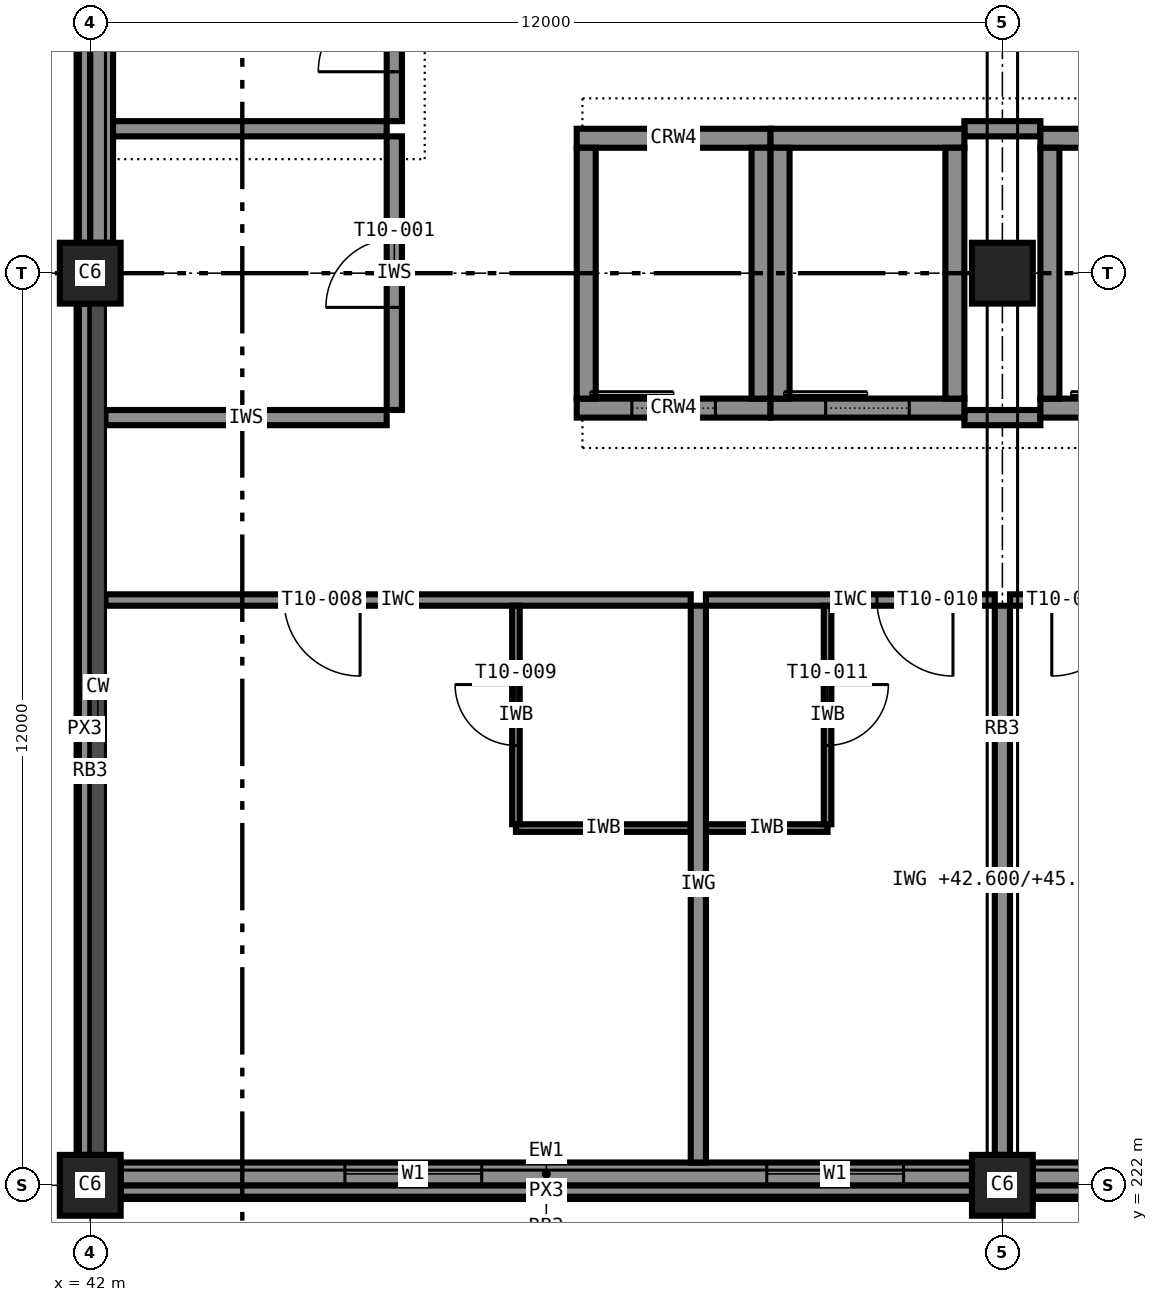
"""IFC4 building model, lengths in metres.
Left out: names, types, materials, properties, quantities, classifications, styles, units other than length and angle.
Written with IfcOpenShell. Run it as: python <this file> out.ifc"""

import sys

from ifc_helpers import new_model, si_unit, direction, frame, frame_2d, origin, origin_2d, place, context, subcontext, project, spatial, rectangle, extrude, element, fill, save


model = new_model("IFC4")
c1 = context("Model", 3, precision=1e-05, world=origin(), true_north=direction((0.0, 1.0)))
c2 = subcontext(c1, "Body", "Model", "MODEL_VIEW")
j1 = project(units=[si_unit("LENGTHUNIT", "METRE"), si_unit("PLANEANGLEUNIT", "RADIAN")], contexts=[c1])
p1 = place(None, origin())
s1 = spatial("IfcSite", under=j1, at=p1, CompositionType="ELEMENT")
p2 = place(p1, origin())
s2 = spatial("IfcBuilding", under=s1, at=p2, CompositionType="ELEMENT")
p3 = place(p2, frame((0.0, 0.0, 42.6)))
s3 = spatial("IfcBuildingStorey", under=s2, at=p3, CompositionType="ELEMENT", Elevation=42.6)
for number, where, z_axis, x_axis in (
    (1, (42.0, 222.0, 0.0), (0.0, 0.0, 1.0), (1.0, 0.0, 0.0)),
    (2, (42.0, 234.0, 0.0), (0.0, 0.0, 1.0), (1.0, 0.0, 0.0)),
    (3, (54.0, 222.0, 0.0), (0.0, 0.0, 1.0), (1.0, 0.0, 0.0)),
    (4, (54.0, 234.0, 0.0), (0.0, 0.0, 1.0), (1.0, 0.0, 0.0)),
):
    element("IfcColumn", number, at=place(p3, frame(where, z_axis=z_axis, x_axis=x_axis)), inside=s3, PredefinedType="COLUMN", context=c2, shape_type="SweptSolid", body=[
        extrude(rectangle(XDim=0.8, YDim=0.8, at=origin_2d()), origin(), (0.0, 0.0, 1.0), 3.6),
    ])
p4 = place(p3, frame((54.5, 232.225, 0.0), z_axis=(0.0, 0.0, 1.0), x_axis=(1.0, 0.0, 0.0)))
e5 = element("IfcWall", 5, at=p4, inside=s3, PredefinedType="SHEAR", context=c2, shape_type="SweptSolid", body=[
    extrude(rectangle(XDim=3.0, YDim=0.25, at=frame_2d((1.5, 0.0))), origin(), (0.0, 0.0, 1.0), 3.6),
])
p5 = place(p4, frame((0.95, 0.0, 0.0)))
e6 = element("IfcOpeningElement", 6, at=p5, cuts=e5, PredefinedType="OPENING", context=c2, shape_type="SweptSolid", body=[
    extrude(rectangle(XDim=1.1, YDim=2.1, at=frame_2d((0.55, 1.05))), frame((0.0, 0.135, 0.0), z_axis=(0.0, -1.0, 0.0), x_axis=(1.0, 0.0, 0.0)), (0.0, 0.0, 1.0), 0.27),
])
p6 = place(p3, frame((54.5, 235.775, 0.0), z_axis=(0.0, 0.0, 1.0), x_axis=(1.0, 0.0, 0.0)))
e7 = element("IfcWall", 7, at=p6, inside=s3, PredefinedType="SHEAR", context=c2, shape_type="SweptSolid", body=[
    extrude(rectangle(XDim=3.0, YDim=0.25, at=frame_2d((1.5, 0.0))), origin(), (0.0, 0.0, 1.0), 3.6),
])
p7 = place(p3, frame((54.625, 232.35, 0.0), z_axis=(0.0, 0.0, 1.0), x_axis=(0.0, 1.0, 0.0)))
e8 = element("IfcWall", 8, at=p7, inside=s3, PredefinedType="SHEAR", context=c2, shape_type="SweptSolid", body=[
    extrude(rectangle(XDim=3.3, YDim=0.25, at=frame_2d((1.65, 0.0))), origin(), (0.0, 0.0, 1.0), 3.6),
])
p8 = place(p3, frame((48.4, 232.225, 0.0), z_axis=(0.0, 0.0, 1.0), x_axis=(1.0, 0.0, 0.0)))
e9 = element("IfcWall", 9, at=p8, inside=s3, PredefinedType="SHEAR", context=c2, shape_type="SweptSolid", body=[
    extrude(rectangle(XDim=2.55, YDim=0.25, at=frame_2d((1.275, 0.0))), origin(), (0.0, 0.0, 1.0), 3.6),
])
p9 = place(p8, frame((0.725, 0.0, 0.0)))
e10 = element("IfcOpeningElement", 10, at=p9, cuts=e9, PredefinedType="OPENING", context=c2, shape_type="SweptSolid", body=[
    extrude(rectangle(XDim=1.1, YDim=2.1, at=frame_2d((0.55, 1.05))), frame((0.0, 0.135, 0.0), z_axis=(0.0, -1.0, 0.0), x_axis=(1.0, 0.0, 0.0)), (0.0, 0.0, 1.0), 0.27),
])
p10 = place(p3, frame((48.4, 235.775, 0.0), z_axis=(0.0, 0.0, 1.0), x_axis=(1.0, 0.0, 0.0)))
e11 = element("IfcWall", 11, at=p10, inside=s3, PredefinedType="SHEAR", context=c2, shape_type="SweptSolid", body=[
    extrude(rectangle(XDim=2.55, YDim=0.25, at=frame_2d((1.275, 0.0))), origin(), (0.0, 0.0, 1.0), 3.6),
])
for number, where, z_axis, x_axis in (
    (12, (48.525, 232.35, 0.0), (0.0, 0.0, 1.0), (0.0, 1.0, 0.0)),
    (13, (50.825, 232.35, 0.0), (0.0, 0.0, 1.0), (0.0, 1.0, 0.0)),
):
    element("IfcWall", number, at=place(p3, frame(where, z_axis=z_axis, x_axis=x_axis)), inside=s3, PredefinedType="SHEAR", context=c2, shape_type="SweptSolid", body=[
        extrude(rectangle(XDim=3.3, YDim=0.25, at=frame_2d((1.65, 0.0))), origin(), (0.0, 0.0, 1.0), 3.6),
    ])
p11 = place(p3, frame((50.95, 232.225, 0.0), z_axis=(0.0, 0.0, 1.0), x_axis=(1.0, 0.0, 0.0)))
e14 = element("IfcWall", 14, at=p11, inside=s3, PredefinedType="SHEAR", context=c2, shape_type="SweptSolid", body=[
    extrude(rectangle(XDim=2.55, YDim=0.25, at=frame_2d((1.275, 0.0))), origin(), (0.0, 0.0, 1.0), 3.6),
])
p12 = place(p11, frame((0.725, 0.0, 0.0)))
e15 = element("IfcOpeningElement", 15, at=p12, cuts=e14, PredefinedType="OPENING", context=c2, shape_type="SweptSolid", body=[
    extrude(rectangle(XDim=1.1, YDim=2.1, at=frame_2d((0.55, 1.05))), frame((0.0, 0.135, 0.0), z_axis=(0.0, -1.0, 0.0), x_axis=(1.0, 0.0, 0.0)), (0.0, 0.0, 1.0), 0.27),
])
p13 = place(p3, frame((50.95, 235.775, 0.0), z_axis=(0.0, 0.0, 1.0), x_axis=(1.0, 0.0, 0.0)))
e16 = element("IfcWall", 16, at=p13, inside=s3, PredefinedType="SHEAR", context=c2, shape_type="SweptSolid", body=[
    extrude(rectangle(XDim=2.55, YDim=0.25, at=frame_2d((1.275, 0.0))), origin(), (0.0, 0.0, 1.0), 3.6),
])
for number, where, z_axis, x_axis in (
    (17, (51.075, 232.35, 0.0), (0.0, 0.0, 1.0), (0.0, 1.0, 0.0)),
    (18, (53.375, 232.35, 0.0), (0.0, 0.0, 1.0), (0.0, 1.0, 0.0)),
):
    element("IfcWall", number, at=place(p3, frame(where, z_axis=z_axis, x_axis=x_axis)), inside=s3, PredefinedType="SHEAR", context=c2, shape_type="SweptSolid", body=[
        extrude(rectangle(XDim=3.3, YDim=0.25, at=frame_2d((1.65, 0.0))), origin(), (0.0, 0.0, 1.0), 3.6),
    ])
p14 = place(p3, frame((42.4, 222.15, 0.0), z_axis=(0.0, 0.0, 1.0), x_axis=(1.0, 0.0, 0.0)))
e19 = element("IfcWall", 19, at=p14, inside=s3, PredefinedType="STANDARD", context=c2, shape_type="SweptSolid", body=[
    extrude(rectangle(XDim=11.2, YDim=0.3, at=frame_2d((5.6, 0.0))), origin(), (0.0, 0.0, 1.0), 2.6),
])
p15 = place(p14, frame((2.95, 0.0, 0.85)))
e20 = element("IfcOpeningElement", 20, at=p15, cuts=e19, PredefinedType="OPENING", context=c2, shape_type="SweptSolid", body=[
    extrude(rectangle(XDim=1.8, YDim=1.75, at=frame_2d((0.9, 0.875))), frame((0.0, 0.16, 0.0), z_axis=(0.0, -1.0, 0.0), x_axis=(1.0, 0.0, 0.0)), (0.0, 0.0, 1.0), 0.32),
])
p16 = place(p14, frame((8.5, 0.0, 0.85)))
e21 = element("IfcOpeningElement", 21, at=p16, cuts=e19, PredefinedType="OPENING", context=c2, shape_type="SweptSolid", body=[
    extrude(rectangle(XDim=1.8, YDim=1.75, at=frame_2d((0.9, 0.875))), frame((0.0, 0.16, 0.0), z_axis=(0.0, -1.0, 0.0), x_axis=(1.0, 0.0, 0.0)), (0.0, 0.0, 1.0), 0.32),
])
p17 = place(p3, frame((54.4, 222.15, 0.0), z_axis=(0.0, 0.0, 1.0), x_axis=(1.0, 0.0, 0.0)))
e22 = element("IfcWall", 22, at=p17, inside=s3, PredefinedType="STANDARD", context=c2, shape_type="SweptSolid", body=[
    extrude(rectangle(XDim=11.2, YDim=0.3, at=frame_2d((5.6, 0.0))), origin(), (0.0, 0.0, 1.0), 2.6),
])
p18 = place(p17, frame((0.9, 0.0, 0.85)))
e23 = element("IfcOpeningElement", 23, at=p18, cuts=e22, PredefinedType="OPENING", context=c2, shape_type="SweptSolid", body=[
    extrude(rectangle(XDim=1.8, YDim=1.75, at=frame_2d((0.9, 0.875))), frame((0.0, 0.16, 0.0), z_axis=(0.0, -1.0, 0.0), x_axis=(1.0, 0.0, 0.0)), (0.0, 0.0, 1.0), 0.32),
])
p19 = place(p17, frame((4.7, 0.0, 0.85)))
e24 = element("IfcOpeningElement", 24, at=p19, cuts=e22, PredefinedType="OPENING", context=c2, shape_type="SweptSolid", body=[
    extrude(rectangle(XDim=1.8, YDim=1.75, at=frame_2d((0.9, 0.875))), frame((0.0, 0.16, 0.0), z_axis=(0.0, -1.0, 0.0), x_axis=(1.0, 0.0, 0.0)), (0.0, 0.0, 1.0), 0.32),
])
p20 = place(p17, frame((8.5, 0.0, 0.85)))
e25 = element("IfcOpeningElement", 25, at=p20, cuts=e22, PredefinedType="OPENING", context=c2, shape_type="SweptSolid", body=[
    extrude(rectangle(XDim=1.8, YDim=1.75, at=frame_2d((0.9, 0.875))), frame((0.0, 0.16, 0.0), z_axis=(0.0, -1.0, 0.0), x_axis=(1.0, 0.0, 0.0)), (0.0, 0.0, 1.0), 0.32),
])
for number, where, z_axis, x_axis in (
    (26, (42.4, 221.925, 3.4), (0.0, 0.0, 1.0), (1.0, 0.0, 0.0)),
    (27, (54.4, 221.925, 3.4), (0.0, 0.0, 1.0), (1.0, 0.0, 0.0)),
):
    element("IfcWall", number, at=place(p3, frame(where, z_axis=z_axis, x_axis=x_axis)), inside=s3, PredefinedType="STANDARD", context=c2, shape_type="SweptSolid", body=[
        extrude(rectangle(XDim=11.2, YDim=0.15, at=frame_2d((5.6, 0.0))), origin(), (0.0, 0.0, 1.0), 0.2),
    ])
p21 = place(p3, frame((42.15, 245.6, 0.0), z_axis=(0.0, 0.0, 1.0), x_axis=(0.0, -1.0, 0.0)))
e28 = element("IfcWall", 28, at=p21, inside=s3, PredefinedType="STANDARD", context=c2, shape_type="SweptSolid", body=[
    extrude(rectangle(XDim=11.2, YDim=0.3, at=frame_2d((5.6, 0.0))), origin(), (0.0, 0.0, 1.0), 2.6),
])
for number, where, z_axis, x_axis in (
    (29, (41.925, 245.6, 3.4), (0.0, 0.0, 1.0), (0.0, -1.0, 0.0)),
    (30, (41.925, 233.6, 3.4), (0.0, 0.0, 1.0), (0.0, -1.0, 0.0)),
):
    element("IfcWall", number, at=place(p3, frame(where, z_axis=z_axis, x_axis=x_axis)), inside=s3, PredefinedType="STANDARD", context=c2, shape_type="SweptSolid", body=[
        extrude(rectangle(XDim=11.2, YDim=0.15, at=frame_2d((5.6, 0.0))), origin(), (0.0, 0.0, 1.0), 0.2),
    ])
p22 = place(p3, frame((42.2, 232.1, 0.0), z_axis=(0.0, 0.0, 1.0), x_axis=(1.0, 0.0, 0.0)))
e31 = element("IfcWall", 31, at=p22, inside=s3, PredefinedType="PARTITIONING", context=c2, shape_type="SweptSolid", body=[
    extrude(rectangle(XDim=3.7, YDim=0.2, at=frame_2d((1.85, 0.0))), origin(), (0.0, 0.0, 1.0), 3.4),
])
p23 = place(p3, frame((53.5, 232.1, 0.0), z_axis=(0.0, 0.0, 1.0), x_axis=(1.0, 0.0, 0.0)))
e32 = element("IfcWall", 32, at=p23, inside=s3, PredefinedType="PARTITIONING", context=c2, shape_type="SweptSolid", body=[
    extrude(rectangle(XDim=1.0, YDim=0.2, at=frame_2d((0.5, 0.0))), origin(), (0.0, 0.0, 1.0), 3.4),
])
p24 = place(p3, frame((42.3, 235.9, 0.0), z_axis=(0.0, 0.0, 1.0), x_axis=(1.0, 0.0, 0.0)))
e33 = element("IfcWall", 33, at=p24, inside=s3, PredefinedType="PARTITIONING", context=c2, shape_type="SweptSolid", body=[
    extrude(rectangle(XDim=3.6, YDim=0.2, at=frame_2d((1.8, 0.0))), origin(), (0.0, 0.0, 1.0), 3.4),
])
p25 = place(p3, frame((53.5, 235.9, 0.0), z_axis=(0.0, 0.0, 1.0), x_axis=(1.0, 0.0, 0.0)))
e34 = element("IfcWall", 34, at=p25, inside=s3, PredefinedType="PARTITIONING", context=c2, shape_type="SweptSolid", body=[
    extrude(rectangle(XDim=1.0, YDim=0.2, at=frame_2d((0.5, 0.0))), origin(), (0.0, 0.0, 1.0), 3.4),
])
p26 = place(p3, frame((46.0, 232.2, 0.0), z_axis=(0.0, 0.0, 1.0), x_axis=(0.0, 1.0, 0.0)))
e35 = element("IfcWall", 35, at=p26, inside=s3, PredefinedType="PARTITIONING", context=c2, shape_type="SweptSolid", body=[
    extrude(rectangle(XDim=3.6, YDim=0.2, at=frame_2d((1.8, 0.0))), origin(), (0.0, 0.0, 1.0), 3.4),
])
p27 = place(p26, frame((1.35, 0.0, 0.0)))
e36 = element("IfcOpeningElement", 36, at=p27, cuts=e35, PredefinedType="OPENING", context=c2, shape_type="SweptSolid", body=[
    extrude(rectangle(XDim=0.9, YDim=2.1, at=frame_2d((0.45, 1.05))), frame((0.0, 0.11, 0.0), z_axis=(0.0, -1.0, 0.0), x_axis=(1.0, 0.0, 0.0)), (0.0, 0.0, 1.0), 0.22),
])
p28 = place(p3, frame((46.0, 236.0, 0.0), z_axis=(0.0, 0.0, 1.0), x_axis=(0.0, 1.0, 0.0)))
e37 = element("IfcWall", 37, at=p28, inside=s3, PredefinedType="PARTITIONING", context=c2, shape_type="SweptSolid", body=[
    extrude(rectangle(XDim=2.3, YDim=0.2, at=frame_2d((1.15, 0.0))), origin(), (0.0, 0.0, 1.0), 3.4),
])
p29 = place(p28, frame((0.65, 0.0, 0.0)))
e38 = element("IfcOpeningElement", 38, at=p29, cuts=e37, PredefinedType="OPENING", context=c2, shape_type="SweptSolid", body=[
    extrude(rectangle(XDim=1.0, YDim=2.1, at=frame_2d((0.5, 1.05))), frame((0.0, 0.11, 0.0), z_axis=(0.0, -1.0, 0.0), x_axis=(1.0, 0.0, 0.0)), (0.0, 0.0, 1.0), 0.22),
])
p30 = place(p3, frame((49.9, 229.7, 0.0), z_axis=(0.0, 0.0, 1.0), x_axis=(-1.0, 0.0, 0.0)))
e39 = element("IfcWall", 39, at=p30, inside=s3, PredefinedType="PARTITIONING", context=c2, shape_type="SweptSolid", body=[
    extrude(rectangle(XDim=7.7, YDim=0.15, at=frame_2d((3.85, 0.0))), origin(), (0.0, 0.0, 1.0), 3.4),
])
p31 = place(p30, frame((4.35, 0.0, 0.0)))
e40 = element("IfcOpeningElement", 40, at=p31, cuts=e39, PredefinedType="OPENING", context=c2, shape_type="SweptSolid", body=[
    extrude(rectangle(XDim=1.0, YDim=2.1, at=frame_2d((0.5, 1.05))), frame((0.0, 0.085, 0.0), z_axis=(0.0, -1.0, 0.0), x_axis=(1.0, 0.0, 0.0)), (0.0, 0.0, 1.0), 0.17),
])
p32 = place(p3, frame((47.6, 226.7, 0.0), z_axis=(0.0, 0.0, 1.0), x_axis=(1.0, 0.0, 0.0)))
e41 = element("IfcWall", 41, at=p32, inside=s3, PredefinedType="PARTITIONING", context=c2, shape_type="SweptSolid", body=[
    extrude(rectangle(XDim=2.3, YDim=0.1, at=frame_2d((1.15, 0.0))), origin(), (0.0, 0.0, 1.0), 3.4),
])
p33 = place(p3, frame((47.6, 226.75, 0.0), z_axis=(0.0, 0.0, 1.0), x_axis=(0.0, 1.0, 0.0)))
e42 = element("IfcWall", 42, at=p33, inside=s3, PredefinedType="PARTITIONING", context=c2, shape_type="SweptSolid", body=[
    extrude(rectangle(XDim=2.875, YDim=0.1, at=frame_2d((1.438, 0.0))), origin(), (0.0, 0.0, 1.0), 3.4),
])
p34 = place(p33, frame((1.038, 0.0, 0.0)))
e43 = element("IfcOpeningElement", 43, at=p34, cuts=e42, PredefinedType="OPENING", context=c2, shape_type="SweptSolid", body=[
    extrude(rectangle(XDim=0.8, YDim=2.1, at=frame_2d((0.4, 1.05))), frame((0.0, 0.06, 0.0), z_axis=(0.0, -1.0, 0.0), x_axis=(1.0, 0.0, 0.0)), (0.0, 0.0, 1.0), 0.12),
])
p35 = place(p3, frame((53.9, 229.7, 0.0), z_axis=(0.0, 0.0, 1.0), x_axis=(-1.0, 0.0, 0.0)))
e44 = element("IfcWall", 44, at=p35, inside=s3, PredefinedType="PARTITIONING", context=c2, shape_type="SweptSolid", body=[
    extrude(rectangle(XDim=3.8, YDim=0.15, at=frame_2d((1.9, 0.0))), origin(), (0.0, 0.0, 1.0), 3.4),
])
p36 = place(p35, frame((0.55, 0.0, 0.0)))
e45 = element("IfcOpeningElement", 45, at=p36, cuts=e44, PredefinedType="OPENING", context=c2, shape_type="SweptSolid", body=[
    extrude(rectangle(XDim=1.0, YDim=2.1, at=frame_2d((0.5, 1.05))), frame((0.0, 0.085, 0.0), z_axis=(0.0, -1.0, 0.0), x_axis=(1.0, 0.0, 0.0)), (0.0, 0.0, 1.0), 0.17),
])
p37 = place(p3, frame((50.1, 226.7, 0.0), z_axis=(0.0, 0.0, 1.0), x_axis=(1.0, 0.0, 0.0)))
e46 = element("IfcWall", 46, at=p37, inside=s3, PredefinedType="PARTITIONING", context=c2, shape_type="SweptSolid", body=[
    extrude(rectangle(XDim=1.6, YDim=0.1, at=frame_2d((0.8, 0.0))), origin(), (0.0, 0.0, 1.0), 3.4),
])
p38 = place(p3, frame((51.7, 229.625, 0.0), z_axis=(0.0, 0.0, 1.0), x_axis=(0.0, -1.0, 0.0)))
e47 = element("IfcWall", 47, at=p38, inside=s3, PredefinedType="PARTITIONING", context=c2, shape_type="SweptSolid", body=[
    extrude(rectangle(XDim=2.875, YDim=0.1, at=frame_2d((1.438, 0.0))), origin(), (0.0, 0.0, 1.0), 3.4),
])
p39 = place(p38, frame((1.038, 0.0, 0.0)))
e48 = element("IfcOpeningElement", 48, at=p39, cuts=e47, PredefinedType="OPENING", context=c2, shape_type="SweptSolid", body=[
    extrude(rectangle(XDim=0.8, YDim=2.1, at=frame_2d((0.4, 1.05))), frame((0.0, 0.06, 0.0), z_axis=(0.0, -1.0, 0.0), x_axis=(1.0, 0.0, 0.0)), (0.0, 0.0, 1.0), 0.12),
])
p40 = place(p3, frame((57.9, 229.7, 0.0), z_axis=(0.0, 0.0, 1.0), x_axis=(-1.0, 0.0, 0.0)))
e49 = element("IfcWall", 49, at=p40, inside=s3, PredefinedType="PARTITIONING", context=c2, shape_type="SweptSolid", body=[
    extrude(rectangle(XDim=3.8, YDim=0.15, at=frame_2d((1.9, 0.0))), origin(), (0.0, 0.0, 1.0), 3.4),
])
p41 = place(p40, frame((2.25, 0.0, 0.0)))
e50 = element("IfcOpeningElement", 50, at=p41, cuts=e49, PredefinedType="OPENING", context=c2, shape_type="SweptSolid", body=[
    extrude(rectangle(XDim=1.0, YDim=2.1, at=frame_2d((0.5, 1.05))), frame((0.0, 0.085, 0.0), z_axis=(0.0, -1.0, 0.0), x_axis=(1.0, 0.0, 0.0)), (0.0, 0.0, 1.0), 0.17),
])
p42 = place(p3, frame((50.0, 222.3, 0.0), z_axis=(0.0, 0.0, 1.0), x_axis=(0.0, 1.0, 0.0)))
e51 = element("IfcWall", 51, at=p42, inside=s3, PredefinedType="PARTITIONING", context=c2, shape_type="SweptSolid", body=[
    extrude(rectangle(XDim=7.325, YDim=0.2, at=frame_2d((3.663, 0.0))), origin(), (0.0, 0.0, 1.0), 3.4),
])
p43 = place(p3, frame((54.0, 222.4, 0.0), z_axis=(0.0, 0.0, 1.0), x_axis=(0.0, 1.0, 0.0)))
e52 = element("IfcWall", 52, at=p43, inside=s3, PredefinedType="PARTITIONING", context=c2, shape_type="SweptSolid", body=[
    extrude(rectangle(XDim=7.225, YDim=0.2, at=frame_2d((3.613, 0.0))), origin(), (0.0, 0.0, 1.0), 2.6),
])
p44 = place(p15, origin())
e53 = element("IfcWindow", 53, at=p44, inside=s3, PartitioningType="SINGLE_PANEL", PredefinedType="WINDOW", context=c2, shape_type="SweptSolid", body=[
    extrude(rectangle(XDim=1.8, YDim=1.75, at=frame_2d((0.9, 0.875))), frame((0.0, 0.03, 0.0), z_axis=(0.0, -1.0, 0.0), x_axis=(1.0, 0.0, 0.0)), (0.0, 0.0, 1.0), 0.06),
])
fill(e20, e53)
p45 = place(p16, origin())
e54 = element("IfcWindow", 54, at=p45, inside=s3, PartitioningType="SINGLE_PANEL", PredefinedType="WINDOW", context=c2, shape_type="SweptSolid", body=[
    extrude(rectangle(XDim=1.8, YDim=1.75, at=frame_2d((0.9, 0.875))), frame((0.0, 0.03, 0.0), z_axis=(0.0, -1.0, 0.0), x_axis=(1.0, 0.0, 0.0)), (0.0, 0.0, 1.0), 0.06),
])
fill(e21, e54)
p46 = place(p27, origin())
e55 = element("IfcDoor", 55, at=p46, inside=s3, OperationType="SINGLE_SWING_LEFT", PredefinedType="DOOR", context=c2, shape_type="SweptSolid", body=[
    extrude(rectangle(XDim=0.9, YDim=2.1, at=frame_2d((0.45, 1.05))), frame((0.0, 0.025, 0.0), z_axis=(0.0, -1.0, 0.0), x_axis=(1.0, 0.0, 0.0)), (0.0, 0.0, 1.0), 0.05),
])
fill(e36, e55)
p47 = place(p29, origin())
e56 = element("IfcDoor", 56, at=p47, inside=s3, OperationType="SINGLE_SWING_LEFT", PredefinedType="DOOR", context=c2, shape_type="SweptSolid", body=[
    extrude(rectangle(XDim=1.0, YDim=2.1, at=frame_2d((0.5, 1.05))), frame((0.0, 0.025, 0.0), z_axis=(0.0, -1.0, 0.0), x_axis=(1.0, 0.0, 0.0)), (0.0, 0.0, 1.0), 0.05),
])
fill(e38, e56)
p48 = place(p31, origin())
e57 = element("IfcDoor", 57, at=p48, inside=s3, OperationType="SINGLE_SWING_LEFT", PredefinedType="DOOR", context=c2, shape_type="SweptSolid", body=[
    extrude(rectangle(XDim=1.0, YDim=2.1, at=frame_2d((0.5, 1.05))), frame((0.0, 0.025, 0.0), z_axis=(0.0, -1.0, 0.0), x_axis=(1.0, 0.0, 0.0)), (0.0, 0.0, 1.0), 0.05),
])
fill(e40, e57)
p49 = place(p34, origin())
e58 = element("IfcDoor", 58, at=p49, inside=s3, OperationType="SINGLE_SWING_RIGHT", PredefinedType="DOOR", context=c2, shape_type="SweptSolid", body=[
    extrude(rectangle(XDim=0.8, YDim=2.1, at=frame_2d((0.4, 1.05))), frame((0.0, 0.025, 0.0), z_axis=(0.0, -1.0, 0.0), x_axis=(1.0, 0.0, 0.0)), (0.0, 0.0, 1.0), 0.05),
])
fill(e43, e58)
p50 = place(p36, origin())
e59 = element("IfcDoor", 59, at=p50, inside=s3, OperationType="SINGLE_SWING_LEFT", PredefinedType="DOOR", context=c2, shape_type="SweptSolid", body=[
    extrude(rectangle(XDim=1.0, YDim=2.1, at=frame_2d((0.5, 1.05))), frame((0.0, 0.025, 0.0), z_axis=(0.0, -1.0, 0.0), x_axis=(1.0, 0.0, 0.0)), (0.0, 0.0, 1.0), 0.05),
])
fill(e45, e59)
p51 = place(p39, origin())
e60 = element("IfcDoor", 60, at=p51, inside=s3, OperationType="SINGLE_SWING_LEFT", PredefinedType="DOOR", context=c2, shape_type="SweptSolid", body=[
    extrude(rectangle(XDim=0.8, YDim=2.1, at=frame_2d((0.4, 1.05))), frame((0.0, 0.025, 0.0), z_axis=(0.0, -1.0, 0.0), x_axis=(1.0, 0.0, 0.0)), (0.0, 0.0, 1.0), 0.05),
])
fill(e48, e60)
p52 = place(p41, origin())
e61 = element("IfcDoor", 61, at=p52, inside=s3, OperationType="SINGLE_SWING_RIGHT", PredefinedType="DOOR", context=c2, shape_type="SweptSolid", body=[
    extrude(rectangle(XDim=1.0, YDim=2.1, at=frame_2d((0.5, 1.05))), frame((0.0, 0.025, 0.0), z_axis=(0.0, -1.0, 0.0), x_axis=(1.0, 0.0, 0.0)), (0.0, 0.0, 1.0), 0.05),
])
fill(e50, e61)
p53 = place(p9, origin())
e62 = element("IfcDoor", 62, at=p53, inside=s3, OperationType="SLIDING_TO_LEFT", PredefinedType="DOOR", context=c2, shape_type="SweptSolid", body=[
    extrude(rectangle(XDim=1.1, YDim=2.1, at=frame_2d((0.55, 1.05))), frame((0.0, 0.025, 0.0), z_axis=(0.0, -1.0, 0.0), x_axis=(1.0, 0.0, 0.0)), (0.0, 0.0, 1.0), 0.05),
])
fill(e10, e62)
p54 = place(p12, origin())
e63 = element("IfcDoor", 63, at=p54, inside=s3, OperationType="SLIDING_TO_LEFT", PredefinedType="DOOR", context=c2, shape_type="SweptSolid", body=[
    extrude(rectangle(XDim=1.1, YDim=2.1, at=frame_2d((0.55, 1.05))), frame((0.0, 0.025, 0.0), z_axis=(0.0, -1.0, 0.0), x_axis=(1.0, 0.0, 0.0)), (0.0, 0.0, 1.0), 0.05),
])
fill(e15, e63)
save(model, sys.argv[1])
